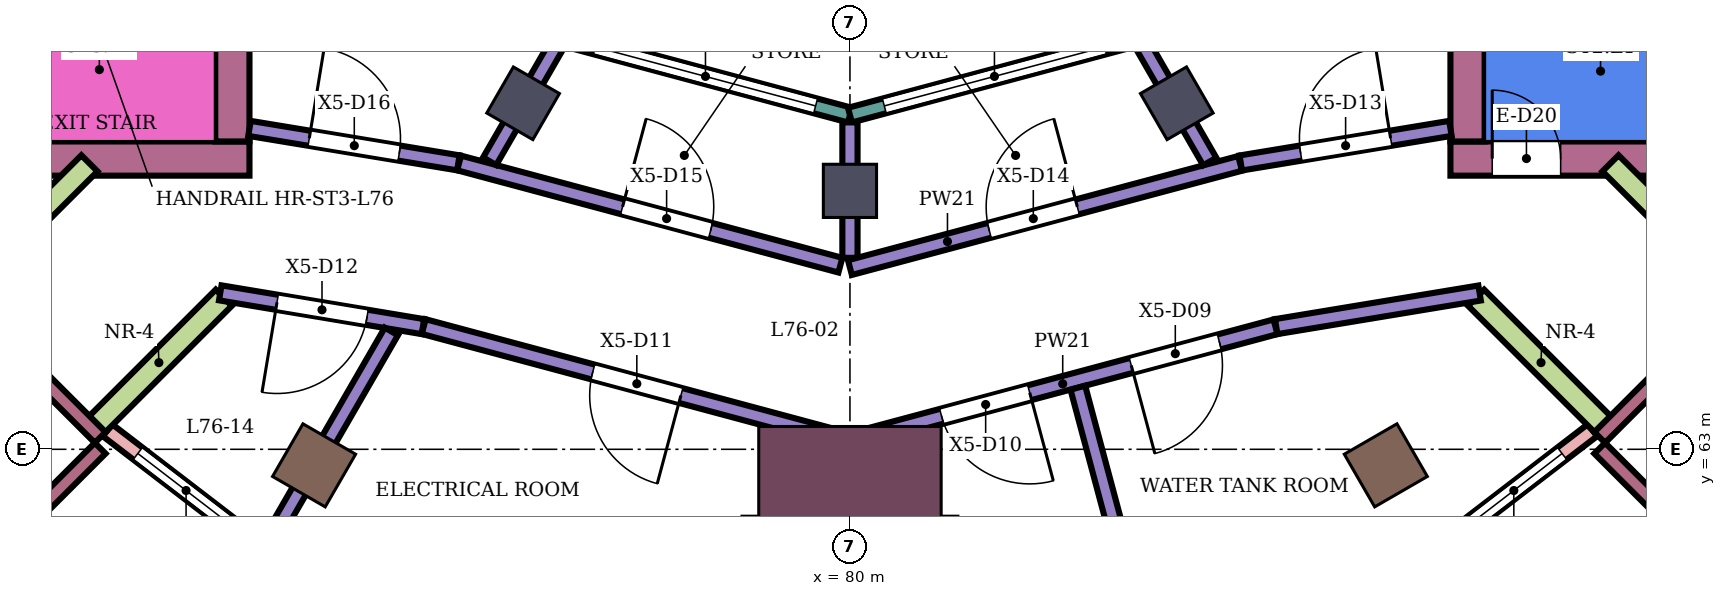
"""IFC4 building model, lengths in metres.
Left out: names, types, materials, properties, quantities, classifications, styles, units other than length and angle.
Written with IfcOpenShell. Run it as: python <this file> out.ifc"""

import sys

from ifc_helpers import new_model, si_unit, direction, frame, frame_2d, origin, origin_2d, place, context, subcontext, project, spatial, rectangle, extrude, element, fill, save


model = new_model("IFC4")
c1 = context("Model", 3, precision=1e-05, world=origin(), true_north=direction((0.0, 1.0)))
c2 = subcontext(c1, "Body", "Model", "MODEL_VIEW")
j1 = project(units=[si_unit("LENGTHUNIT", "METRE"), si_unit("PLANEANGLEUNIT", "RADIAN")], contexts=[c1])
p1 = place(None, origin())
s1 = spatial("IfcSite", under=j1, at=p1, CompositionType="ELEMENT")
p2 = place(p1, origin())
s2 = spatial("IfcBuilding", under=s1, at=p2, CompositionType="ELEMENT")
p3 = place(p2, frame((0.0, 0.0, 333.1)))
s3 = spatial("IfcBuildingStorey", under=s2, at=p3, CompositionType="ELEMENT", Elevation=333.1)
for number, where, z_axis, x_axis in (
    (1, (72.95, 62.789, 0.0), (0.0, 0.0, 1.0), (-0.5, -0.866, 0.0)),
    (2, (87.05, 62.789, 0.0), (0.0, 0.0, 1.0), (0.5, -0.866, 0.0)),
):
    element("IfcColumn", number, at=place(p3, frame(where, z_axis=z_axis, x_axis=x_axis)), inside=s3, PredefinedType="COLUMN", context=c2, shape_type="SweptSolid", body=[
        extrude(rectangle(XDim=0.8, YDim=0.8, at=origin_2d()), origin(), (0.0, 0.0, 1.0), 4.5),
    ])
for number, where, z_axis, x_axis in (
    (3, (75.7, 67.552, 0.0), (0.0, 0.0, 1.0), (-0.5, -0.866, 0.0)),
    (4, (80.0, 66.4, 0.0), (0.0, 0.0, 1.0), (0.0, -1.0, 0.0)),
    (5, (84.3, 67.552, 0.0), (0.0, 0.0, 1.0), (0.5, -0.866, 0.0)),
):
    element("IfcColumn", number, at=place(p3, frame(where, z_axis=z_axis, x_axis=x_axis)), inside=s3, PredefinedType="COLUMN", context=c2, shape_type="SweptSolid", body=[
        extrude(rectangle(XDim=0.7, YDim=0.7, at=origin_2d()), origin(), (0.0, 0.0, 1.0), 4.5),
    ])
p4 = place(p3, frame((80.0, 62.7, 0.0), z_axis=(0.0, 0.0, 1.0), x_axis=(0.0, -1.0, 0.0)))
e6 = element("IfcColumn", 6, at=p4, inside=s3, PredefinedType="COLUMN", context=c2, shape_type="SweptSolid", body=[
    extrude(rectangle(XDim=1.2, YDim=2.4, at=origin_2d()), origin(), (0.0, 0.0, 1.0), 4.5),
])
p5 = place(p3, frame((87.9, 66.825, 0.0), z_axis=(0.0, 0.0, 1.0), x_axis=(1.0, 0.0, 0.0)))
e7 = element("IfcWall", 7, at=p5, inside=s3, PredefinedType="SHEAR", context=c2, shape_type="SweptSolid", body=[
    extrude(rectangle(XDim=6.3, YDim=0.45, at=frame_2d((3.15, 0.0))), origin(), (0.0, 0.0, 1.0), 4.15),
])
p6 = place(p5, frame((0.55, 0.0, 0.0)))
e8 = element("IfcOpeningElement", 8, at=p6, cuts=e7, PredefinedType="OPENING", context=c2, shape_type="SweptSolid", body=[
    extrude(rectangle(XDim=0.9, YDim=2.1, at=frame_2d((0.45, 1.05))), frame((0.0, 0.235, 0.0), z_axis=(0.0, -1.0, 0.0), x_axis=(1.0, 0.0, 0.0)), (0.0, 0.0, 1.0), 0.47),
])
p7 = place(p3, frame((88.125, 67.05, 0.0), z_axis=(0.0, 0.0, 1.0), x_axis=(0.0, 1.0, 0.0)))
e9 = element("IfcWall", 9, at=p7, inside=s3, PredefinedType="SHEAR", context=c2, shape_type="SweptSolid", body=[
    extrude(rectangle(XDim=7.95, YDim=0.45, at=frame_2d((3.975, 0.0))), origin(), (0.0, 0.0, 1.0), 4.15),
])
p8 = place(p3, frame((72.1, 66.825, 0.0), z_axis=(0.0, 0.0, 1.0), x_axis=(-1.0, 0.0, 0.0)))
e10 = element("IfcWall", 10, at=p8, inside=s3, PredefinedType="SHEAR", context=c2, shape_type="SweptSolid", body=[
    extrude(rectangle(XDim=3.8, YDim=0.45, at=frame_2d((1.9, 0.0))), origin(), (0.0, 0.0, 1.0), 4.15),
])
p9 = place(p3, frame((71.875, 75.0, 0.0), z_axis=(0.0, 0.0, 1.0), x_axis=(0.0, -1.0, 0.0)))
e11 = element("IfcWall", 11, at=p9, inside=s3, PredefinedType="SHEAR", context=c2, shape_type="SweptSolid", body=[
    extrude(rectangle(XDim=7.95, YDim=0.45, at=frame_2d((3.975, 0.0))), origin(), (0.0, 0.0, 1.0), 4.15),
])
p10 = place(p3, frame((70.231, 63.251, 0.0), z_axis=(0.0, 0.0, 1.0), x_axis=(0.793402901715, -0.608696833859, 0.0)))
e12 = element("IfcWall", 12, at=p10, inside=s3, PredefinedType="NOTDEFINED", context=c2, shape_type="SweptSolid", body=[
    extrude(rectangle(XDim=2.608, YDim=0.2, at=frame_2d((1.304, 0.0))), origin(), (0.0, 0.0, 1.0), 4.5),
])
p11 = place(p10, frame((0.504, 0.0, 0.5)))
e13 = element("IfcOpeningElement", 13, at=p11, cuts=e12, PredefinedType="OPENING", context=c2, shape_type="SweptSolid", body=[
    extrude(rectangle(XDim=1.6, YDim=3.2, at=frame_2d((0.8, 1.6))), frame((0.0, 0.11, 0.0), z_axis=(0.0, -1.0, 0.0), x_axis=(1.0, 0.0, 0.0)), (0.0, 0.0, 1.0), 0.22),
])
p12 = place(p3, frame((87.699, 61.664, 0.0), z_axis=(0.0, 0.0, 1.0), x_axis=(0.793402901715, 0.608696833859, 0.0)))
e14 = element("IfcWall", 14, at=p12, inside=s3, PredefinedType="NOTDEFINED", context=c2, shape_type="SweptSolid", body=[
    extrude(rectangle(XDim=2.608, YDim=0.2, at=frame_2d((1.304, 0.0))), origin(), (0.0, 0.0, 1.0), 4.5),
])
p13 = place(p12, frame((0.504, 0.0, 0.5)))
e15 = element("IfcOpeningElement", 15, at=p13, cuts=e14, PredefinedType="OPENING", context=c2, shape_type="SweptSolid", body=[
    extrude(rectangle(XDim=1.6, YDim=3.2, at=frame_2d((0.8, 1.6))), frame((0.0, 0.11, 0.0), z_axis=(0.0, -1.0, 0.0), x_axis=(1.0, 0.0, 0.0)), (0.0, 0.0, 1.0), 0.22),
])
for number, where, z_axis, x_axis in (
    (16, (69.994, 66.762, 0.0), (0.0, 0.0, 1.0), (-0.707, -0.707, 0.0)),
    (17, (71.762, 64.994, 0.0), (0.0, 0.0, 1.0), (-0.707, -0.707, 0.0)),
    (18, (88.238, 64.994, 0.0), (0.0, 0.0, 1.0), (0.707, -0.707, 0.0)),
    (19, (90.006, 66.762, 0.0), (0.0, 0.0, 1.0), (0.707, -0.707, 0.0)),
):
    element("IfcWall", number, at=place(p3, frame(where, z_axis=z_axis, x_axis=x_axis)), inside=s3, PredefinedType="NOTDEFINED", context=c2, shape_type="SweptSolid", body=[
        extrude(rectangle(XDim=2.416, YDim=0.3, at=frame_2d((1.208, 0.0))), origin(), (0.0, 0.0, 1.0), 4.5),
    ])
p14 = place(p3, frame((76.198, 68.415, 0.0), z_axis=(0.0, 0.0, 1.0), x_axis=(0.965933654434, -0.258789828301, 0.0)))
e20 = element("IfcWall", 20, at=p14, inside=s3, PredefinedType="NOTDEFINED", context=c2, shape_type="SweptSolid", body=[
    extrude(rectangle(XDim=3.936, YDim=0.2, at=frame_2d((1.968, 0.0))), origin(), (0.0, 0.0, 1.0), 4.5),
])
p15 = place(p14, frame((0.468, 0.0, 0.9)))
e21 = element("IfcOpeningElement", 21, at=p15, cuts=e20, PredefinedType="OPENING", context=c2, shape_type="SweptSolid", body=[
    extrude(rectangle(XDim=3.0, YDim=2.3, at=frame_2d((1.5, 1.15))), frame((0.0, 0.11, 0.0), z_axis=(0.0, -1.0, 0.0), x_axis=(1.0, 0.0, 0.0)), (0.0, 0.0, 1.0), 0.22),
])
p16 = place(p3, frame((80.0, 67.396, 0.0), z_axis=(0.0, 0.0, 1.0), x_axis=(0.965933654434, 0.258789828301, 0.0)))
e22 = element("IfcWall", 22, at=p16, inside=s3, PredefinedType="NOTDEFINED", context=c2, shape_type="SweptSolid", body=[
    extrude(rectangle(XDim=3.936, YDim=0.2, at=frame_2d((1.968, 0.0))), origin(), (0.0, 0.0, 1.0), 4.5),
])
p17 = place(p16, frame((0.468, 0.0, 0.9)))
e23 = element("IfcOpeningElement", 23, at=p17, cuts=e22, PredefinedType="OPENING", context=c2, shape_type="SweptSolid", body=[
    extrude(rectangle(XDim=3.0, YDim=2.3, at=frame_2d((1.5, 1.15))), frame((0.0, 0.11, 0.0), z_axis=(0.0, -1.0, 0.0), x_axis=(1.0, 0.0, 0.0)), (0.0, 0.0, 1.0), 0.22),
])
p18 = place(p3, frame((91.844, 65.136, 0.0), z_axis=(0.0, 0.0, 1.0), x_axis=(-0.707106781187, -0.707106781187, 0.0)))
e24 = element("IfcWall", 24, at=p18, inside=s3, PredefinedType="PARAPET", context=c2, shape_type="SweptSolid", body=[
    extrude(rectangle(XDim=2.8, YDim=0.2, at=frame_2d((1.4, 0.0))), origin(), (0.0, 0.0, 1.0), 1.1),
])
for number, where, z_axis, x_axis in (
    (25, (89.864, 63.015, 0.0), (0.0, 0.0, 1.0), (0.707, -0.707, 0.0)),
    (26, (68.767, 61.646, 0.0), (0.0, 0.0, 1.0), (0.707, 0.707, 0.0)),
):
    element("IfcWall", number, at=place(p3, frame(where, z_axis=z_axis, x_axis=x_axis)), inside=s3, PredefinedType="PARAPET", context=c2, shape_type="SweptSolid", body=[
        extrude(rectangle(XDim=1.936, YDim=0.2, at=frame_2d((0.968, 0.0))), origin(), (0.0, 0.0, 1.0), 1.1),
    ])
p19 = place(p3, frame((70.136, 63.156, 0.0), z_axis=(0.0, 0.0, 1.0), x_axis=(-0.707106781187, 0.707106781187, 0.0)))
e27 = element("IfcWall", 27, at=p19, inside=s3, PredefinedType="PARAPET", context=c2, shape_type="SweptSolid", body=[
    extrude(rectangle(XDim=2.8, YDim=0.2, at=frame_2d((1.4, 0.0))), origin(), (0.0, 0.0, 1.0), 1.1),
])
p20 = place(p3, frame((71.716, 65.058, 0.0), z_axis=(0.0, 0.0, 1.0), x_axis=(0.986393923832, -0.164398987305, 0.0)))
e28 = element("IfcWall", 28, at=p20, inside=s3, PredefinedType="PARTITIONING", context=c2, shape_type="SweptSolid", body=[
    extrude(rectangle(XDim=2.703, YDim=0.2, at=frame_2d((1.352, 0.0))), origin(), (0.0, 0.0, 1.0), 4.05),
])
p21 = place(p20, frame((0.757, 0.0, 0.0)))
e29 = element("IfcOpeningElement", 29, at=p21, cuts=e28, PredefinedType="OPENING", context=c2, shape_type="SweptSolid", body=[
    extrude(rectangle(XDim=1.2, YDim=2.4, at=frame_2d((0.6, 1.2))), frame((0.0, 0.11, 0.0), z_axis=(0.0, -1.0, 0.0), x_axis=(1.0, 0.0, 0.0)), (0.0, 0.0, 1.0), 0.22),
])
p22 = place(p3, frame((72.1, 67.222, 0.0), z_axis=(0.0, 0.0, 1.0), x_axis=(0.986662669858, -0.162778302943, 0.0)))
e30 = element("IfcWall", 30, at=p22, inside=s3, PredefinedType="PARTITIONING", context=c2, shape_type="SweptSolid", body=[
    extrude(rectangle(XDim=2.785, YDim=0.2, at=frame_2d((1.393, 0.0))), origin(), (0.0, 0.0, 1.0), 4.05),
])
p23 = place(p22, frame((0.798, 0.0, 0.0)))
e31 = element("IfcOpeningElement", 31, at=p23, cuts=e30, PredefinedType="OPENING", context=c2, shape_type="SweptSolid", body=[
    extrude(rectangle(XDim=1.2, YDim=2.4, at=frame_2d((0.6, 1.2))), frame((0.0, 0.11, 0.0), z_axis=(0.0, -1.0, 0.0), x_axis=(1.0, 0.0, 0.0)), (0.0, 0.0, 1.0), 0.22),
])
p24 = place(p3, frame((72.206, 61.501, 0.0), z_axis=(0.0, 0.0, 1.0), x_axis=(0.500038497407, 0.866003176155, 0.0)))
e32 = element("IfcWall", 32, at=p24, inside=s3, PredefinedType="PARTITIONING", context=c2, shape_type="SweptSolid", body=[
    extrude(rectangle(XDim=3.522, YDim=0.2, at=frame_2d((1.761, 0.0))), origin(), (0.0, 0.0, 1.0), 4.05),
])
p25 = place(p3, frame((74.392, 64.615, 0.0), z_axis=(0.0, 0.0, 1.0), x_axis=(0.965852483565, -0.259092608911, 0.0)))
e33 = element("IfcWall", 33, at=p25, inside=s3, PredefinedType="PARTITIONING", context=c2, shape_type="SweptSolid", body=[
    extrude(rectangle(XDim=5.716, YDim=0.2, at=frame_2d((2.858, 0.0))), origin(), (0.0, 0.0, 1.0), 4.05),
])
p26 = place(p25, frame((2.303, 0.0, 0.0)))
e34 = element("IfcOpeningElement", 34, at=p26, cuts=e33, PredefinedType="OPENING", context=c2, shape_type="SweptSolid", body=[
    extrude(rectangle(XDim=1.2, YDim=2.4, at=frame_2d((0.6, 1.2))), frame((0.0, 0.11, 0.0), z_axis=(0.0, -1.0, 0.0), x_axis=(1.0, 0.0, 0.0)), (0.0, 0.0, 1.0), 0.22),
])
p27 = place(p3, frame((74.858, 66.767, 0.0), z_axis=(0.0, 0.0, 1.0), x_axis=(0.965911957735, -0.258870797705, 0.0)))
e35 = element("IfcWall", 35, at=p27, inside=s3, PredefinedType="PARTITIONING", context=c2, shape_type="SweptSolid", body=[
    extrude(rectangle(XDim=5.194, YDim=0.2, at=frame_2d((2.597, 0.0))), origin(), (0.0, 0.0, 1.0), 4.05),
])
p28 = place(p27, frame((2.226, 0.0, 0.0)))
e36 = element("IfcOpeningElement", 36, at=p28, cuts=e35, PredefinedType="OPENING", context=c2, shape_type="SweptSolid", body=[
    extrude(rectangle(XDim=1.2, YDim=2.4, at=frame_2d((0.6, 1.2))), frame((0.0, 0.11, 0.0), z_axis=(0.0, -1.0, 0.0), x_axis=(1.0, 0.0, 0.0)), (0.0, 0.0, 1.0), 0.22),
])
p29 = place(p3, frame((75.26, 66.79, 0.0), z_axis=(0.0, 0.0, 1.0), x_axis=(0.500058459303, 0.865991649659, 0.0)))
e37 = element("IfcWall", 37, at=p29, inside=s3, PredefinedType="PARTITIONING", context=c2, shape_type="SweptSolid", body=[
    extrude(rectangle(XDim=1.782, YDim=0.2, at=frame_2d((0.891, 0.0))), origin(), (0.0, 0.0, 1.0), 4.05),
])
p30 = place(p3, frame((80.0, 62.011, 0.0), z_axis=(0.0, 0.0, 1.0), x_axis=(0.0, 1.0, 0.0)))
e38 = element("IfcWall", 38, at=p30, inside=s3, PredefinedType="PARTITIONING", context=c2, shape_type="SweptSolid", body=[
    extrude(rectangle(XDim=1.009, YDim=0.2, at=frame_2d((0.504, 0.0))), origin(), (0.0, 0.0, 1.0), 4.05),
])
p31 = place(p3, frame((80.0, 63.111, 0.0), z_axis=(0.0, 0.0, 1.0), x_axis=(0.965908374176, 0.258884168492, 0.0)))
e39 = element("IfcWall", 39, at=p31, inside=s3, PredefinedType="PARTITIONING", context=c2, shape_type="SweptSolid", body=[
    extrude(rectangle(XDim=5.796, YDim=0.2, at=frame_2d((2.898, 0.0))), origin(), (0.0, 0.0, 1.0), 4.05),
])
p32 = place(p31, frame((3.832, 0.0, 0.0)))
e40 = element("IfcOpeningElement", 40, at=p32, cuts=e39, PredefinedType="OPENING", context=c2, shape_type="SweptSolid", body=[
    extrude(rectangle(XDim=1.2, YDim=2.4, at=frame_2d((0.6, 1.2))), frame((0.0, 0.11, 0.0), z_axis=(0.0, -1.0, 0.0), x_axis=(1.0, 0.0, 0.0)), (0.0, 0.0, 1.0), 0.22),
])
p33 = place(p31, frame((1.248, 0.0, 0.0)))
e41 = element("IfcOpeningElement", 41, at=p33, cuts=e39, PredefinedType="OPENING", context=c2, shape_type="SweptSolid", body=[
    extrude(rectangle(XDim=1.2, YDim=2.4, at=frame_2d((0.6, 1.2))), frame((0.0, 0.11, 0.0), z_axis=(0.0, -1.0, 0.0), x_axis=(1.0, 0.0, 0.0)), (0.0, 0.0, 1.0), 0.22),
])
p34 = place(p3, frame((80.0, 65.519, 0.0), z_axis=(0.0, 0.0, 1.0), x_axis=(0.0, 1.0, 0.0)))
e42 = element("IfcWall", 42, at=p34, inside=s3, PredefinedType="PARTITIONING", context=c2, shape_type="SweptSolid", body=[
    extrude(rectangle(XDim=1.782, YDim=0.2, at=frame_2d((0.891, 0.0))), origin(), (0.0, 0.0, 1.0), 4.05),
])
p35 = place(p3, frame((80.0, 65.39, 0.0), z_axis=(0.0, 0.0, 1.0), x_axis=(0.966134201203, 0.258040123363, 0.0)))
e43 = element("IfcWall", 43, at=p35, inside=s3, PredefinedType="PARTITIONING", context=c2, shape_type="SweptSolid", body=[
    extrude(rectangle(XDim=5.313, YDim=0.2, at=frame_2d((2.657, 0.0))), origin(), (0.0, 0.0, 1.0), 4.05),
])
p36 = place(p35, frame((1.897, 0.0, 0.0)))
e44 = element("IfcOpeningElement", 44, at=p36, cuts=e43, PredefinedType="OPENING", context=c2, shape_type="SweptSolid", body=[
    extrude(rectangle(XDim=1.2, YDim=2.4, at=frame_2d((0.6, 1.2))), frame((0.0, 0.11, 0.0), z_axis=(0.0, -1.0, 0.0), x_axis=(1.0, 0.0, 0.0)), (0.0, 0.0, 1.0), 0.22),
])
p37 = place(p3, frame((82.998, 63.811, 0.0), z_axis=(0.0, 0.0, 1.0), x_axis=(0.258759455785, -0.965941791228, 0.0)))
e45 = element("IfcWall", 45, at=p37, inside=s3, PredefinedType="PARTITIONING", context=c2, shape_type="SweptSolid", body=[
    extrude(rectangle(XDim=4.003, YDim=0.2, at=frame_2d((2.001, 0.0))), origin(), (0.0, 0.0, 1.0), 4.05),
])
p38 = place(p3, frame((83.843, 68.33, 0.0), z_axis=(0.0, 0.0, 1.0), x_axis=(0.499631524239, -0.866238038871, 0.0)))
e46 = element("IfcWall", 46, at=p38, inside=s3, PredefinedType="PARTITIONING", context=c2, shape_type="SweptSolid", body=[
    extrude(rectangle(XDim=1.782, YDim=0.2, at=frame_2d((0.891, 0.0))), origin(), (0.0, 0.0, 1.0), 4.05),
])
p39 = place(p3, frame((85.142, 66.767, 0.0), z_axis=(0.0, 0.0, 1.0), x_axis=(0.986671073711, 0.16272735573, 0.0)))
e47 = element("IfcWall", 47, at=p39, inside=s3, PredefinedType="PARTITIONING", context=c2, shape_type="SweptSolid", body=[
    extrude(rectangle(XDim=2.795, YDim=0.2, at=frame_2d((1.397, 0.0))), origin(), (0.0, 0.0, 1.0), 4.05),
])
p40 = place(p39, frame((0.798, 0.0, 0.0)))
e48 = element("IfcOpeningElement", 48, at=p40, cuts=e47, PredefinedType="OPENING", context=c2, shape_type="SweptSolid", body=[
    extrude(rectangle(XDim=1.2, YDim=2.4, at=frame_2d((0.6, 1.2))), frame((0.0, 0.11, 0.0), z_axis=(0.0, -1.0, 0.0), x_axis=(1.0, 0.0, 0.0)), (0.0, 0.0, 1.0), 0.22),
])
p41 = place(p3, frame((85.608, 64.614, 0.0), z_axis=(0.0, 0.0, 1.0), x_axis=(0.986607186374, 0.163114253806, 0.0)))
e49 = element("IfcWall", 49, at=p41, inside=s3, PredefinedType="PARTITIONING", context=c2, shape_type="SweptSolid", body=[
    extrude(rectangle(XDim=2.712, YDim=0.2, at=frame_2d((1.356, 0.0))), origin(), (0.0, 0.0, 1.0), 4.05),
])
p42 = place(p11, origin())
e50 = element("IfcWindow", 50, at=p42, inside=s3, PartitioningType="SINGLE_PANEL", PredefinedType="USERDEFINED", context=c2, shape_type="SweptSolid", body=[
    extrude(rectangle(XDim=1.6, YDim=3.2, at=frame_2d((0.8, 1.6))), frame((0.0, 0.03, 0.0), z_axis=(0.0, -1.0, 0.0), x_axis=(1.0, 0.0, 0.0)), (0.0, 0.0, 1.0), 0.06),
])
fill(e13, e50)
p43 = place(p13, origin())
e51 = element("IfcWindow", 51, at=p43, inside=s3, PartitioningType="SINGLE_PANEL", PredefinedType="USERDEFINED", context=c2, shape_type="SweptSolid", body=[
    extrude(rectangle(XDim=1.6, YDim=3.2, at=frame_2d((0.8, 1.6))), frame((0.0, 0.03, 0.0), z_axis=(0.0, -1.0, 0.0), x_axis=(1.0, 0.0, 0.0)), (0.0, 0.0, 1.0), 0.06),
])
fill(e15, e51)
p44 = place(p15, origin())
e52 = element("IfcWindow", 52, at=p44, inside=s3, PartitioningType="SINGLE_PANEL", PredefinedType="WINDOW", context=c2, shape_type="SweptSolid", body=[
    extrude(rectangle(XDim=3.0, YDim=2.3, at=frame_2d((1.5, 1.15))), frame((0.0, 0.03, 0.0), z_axis=(0.0, -1.0, 0.0), x_axis=(1.0, 0.0, 0.0)), (0.0, 0.0, 1.0), 0.06),
])
fill(e21, e52)
p45 = place(p17, origin())
e53 = element("IfcWindow", 53, at=p45, inside=s3, PartitioningType="SINGLE_PANEL", PredefinedType="WINDOW", context=c2, shape_type="SweptSolid", body=[
    extrude(rectangle(XDim=3.0, YDim=2.3, at=frame_2d((1.5, 1.15))), frame((0.0, 0.03, 0.0), z_axis=(0.0, -1.0, 0.0), x_axis=(1.0, 0.0, 0.0)), (0.0, 0.0, 1.0), 0.06),
])
fill(e23, e53)
p46 = place(p32, frame((1.2, 0.0, 0.0), z_axis=(0.0, 0.0, 1.0), x_axis=(-1.0, 0.0, 0.0)))
e54 = element("IfcDoor", 54, at=p46, inside=s3, OperationType="SINGLE_SWING_RIGHT", PredefinedType="DOOR", context=c2, shape_type="SweptSolid", body=[
    extrude(rectangle(XDim=1.2, YDim=2.4, at=frame_2d((0.6, 1.2))), frame((0.0, 0.025, 0.0), z_axis=(0.0, -1.0, 0.0), x_axis=(1.0, 0.0, 0.0)), (0.0, 0.0, 1.0), 0.05),
])
fill(e40, e54)
p47 = place(p33, frame((1.2, 0.0, 0.0), z_axis=(0.0, 0.0, 1.0), x_axis=(-1.0, 0.0, 0.0)))
e55 = element("IfcDoor", 55, at=p47, inside=s3, OperationType="SINGLE_SWING_LEFT", PredefinedType="DOOR", context=c2, shape_type="SweptSolid", body=[
    extrude(rectangle(XDim=1.2, YDim=2.4, at=frame_2d((0.6, 1.2))), frame((0.0, 0.025, 0.0), z_axis=(0.0, -1.0, 0.0), x_axis=(1.0, 0.0, 0.0)), (0.0, 0.0, 1.0), 0.05),
])
fill(e41, e55)
p48 = place(p26, frame((1.2, 0.0, 0.0), z_axis=(0.0, 0.0, 1.0), x_axis=(-1.0, 0.0, 0.0)))
e56 = element("IfcDoor", 56, at=p48, inside=s3, OperationType="SINGLE_SWING_LEFT", PredefinedType="DOOR", context=c2, shape_type="SweptSolid", body=[
    extrude(rectangle(XDim=1.2, YDim=2.4, at=frame_2d((0.6, 1.2))), frame((0.0, 0.025, 0.0), z_axis=(0.0, -1.0, 0.0), x_axis=(1.0, 0.0, 0.0)), (0.0, 0.0, 1.0), 0.05),
])
fill(e34, e56)
p49 = place(p21, frame((1.2, 0.0, 0.0), z_axis=(0.0, 0.0, 1.0), x_axis=(-1.0, 0.0, 0.0)))
e57 = element("IfcDoor", 57, at=p49, inside=s3, OperationType="SINGLE_SWING_RIGHT", PredefinedType="DOOR", context=c2, shape_type="SweptSolid", body=[
    extrude(rectangle(XDim=1.2, YDim=2.4, at=frame_2d((0.6, 1.2))), frame((0.0, 0.025, 0.0), z_axis=(0.0, -1.0, 0.0), x_axis=(1.0, 0.0, 0.0)), (0.0, 0.0, 1.0), 0.05),
])
fill(e29, e57)
p50 = place(p40, origin())
e58 = element("IfcDoor", 58, at=p50, inside=s3, OperationType="SINGLE_SWING_RIGHT", PredefinedType="DOOR", context=c2, shape_type="SweptSolid", body=[
    extrude(rectangle(XDim=1.2, YDim=2.4, at=frame_2d((0.6, 1.2))), frame((0.0, 0.025, 0.0), z_axis=(0.0, -1.0, 0.0), x_axis=(1.0, 0.0, 0.0)), (0.0, 0.0, 1.0), 0.05),
])
fill(e48, e58)
p51 = place(p36, origin())
e59 = element("IfcDoor", 59, at=p51, inside=s3, OperationType="SINGLE_SWING_RIGHT", PredefinedType="DOOR", context=c2, shape_type="SweptSolid", body=[
    extrude(rectangle(XDim=1.2, YDim=2.4, at=frame_2d((0.6, 1.2))), frame((0.0, 0.025, 0.0), z_axis=(0.0, -1.0, 0.0), x_axis=(1.0, 0.0, 0.0)), (0.0, 0.0, 1.0), 0.05),
])
fill(e44, e59)
p52 = place(p28, origin())
e60 = element("IfcDoor", 60, at=p52, inside=s3, OperationType="SINGLE_SWING_LEFT", PredefinedType="DOOR", context=c2, shape_type="SweptSolid", body=[
    extrude(rectangle(XDim=1.2, YDim=2.4, at=frame_2d((0.6, 1.2))), frame((0.0, 0.025, 0.0), z_axis=(0.0, -1.0, 0.0), x_axis=(1.0, 0.0, 0.0)), (0.0, 0.0, 1.0), 0.05),
])
fill(e36, e60)
p53 = place(p23, origin())
e61 = element("IfcDoor", 61, at=p53, inside=s3, OperationType="SINGLE_SWING_LEFT", PredefinedType="DOOR", context=c2, shape_type="SweptSolid", body=[
    extrude(rectangle(XDim=1.2, YDim=2.4, at=frame_2d((0.6, 1.2))), frame((0.0, 0.025, 0.0), z_axis=(0.0, -1.0, 0.0), x_axis=(1.0, 0.0, 0.0)), (0.0, 0.0, 1.0), 0.05),
])
fill(e31, e61)
p54 = place(p6, origin())
e62 = element("IfcDoor", 62, at=p54, inside=s3, OperationType="SINGLE_SWING_LEFT", PredefinedType="DOOR", context=c2, shape_type="SweptSolid", body=[
    extrude(rectangle(XDim=0.9, YDim=2.1, at=frame_2d((0.45, 1.05))), frame((0.0, 0.025, 0.0), z_axis=(0.0, -1.0, 0.0), x_axis=(1.0, 0.0, 0.0)), (0.0, 0.0, 1.0), 0.05),
])
fill(e8, e62)
save(model, sys.argv[1])
